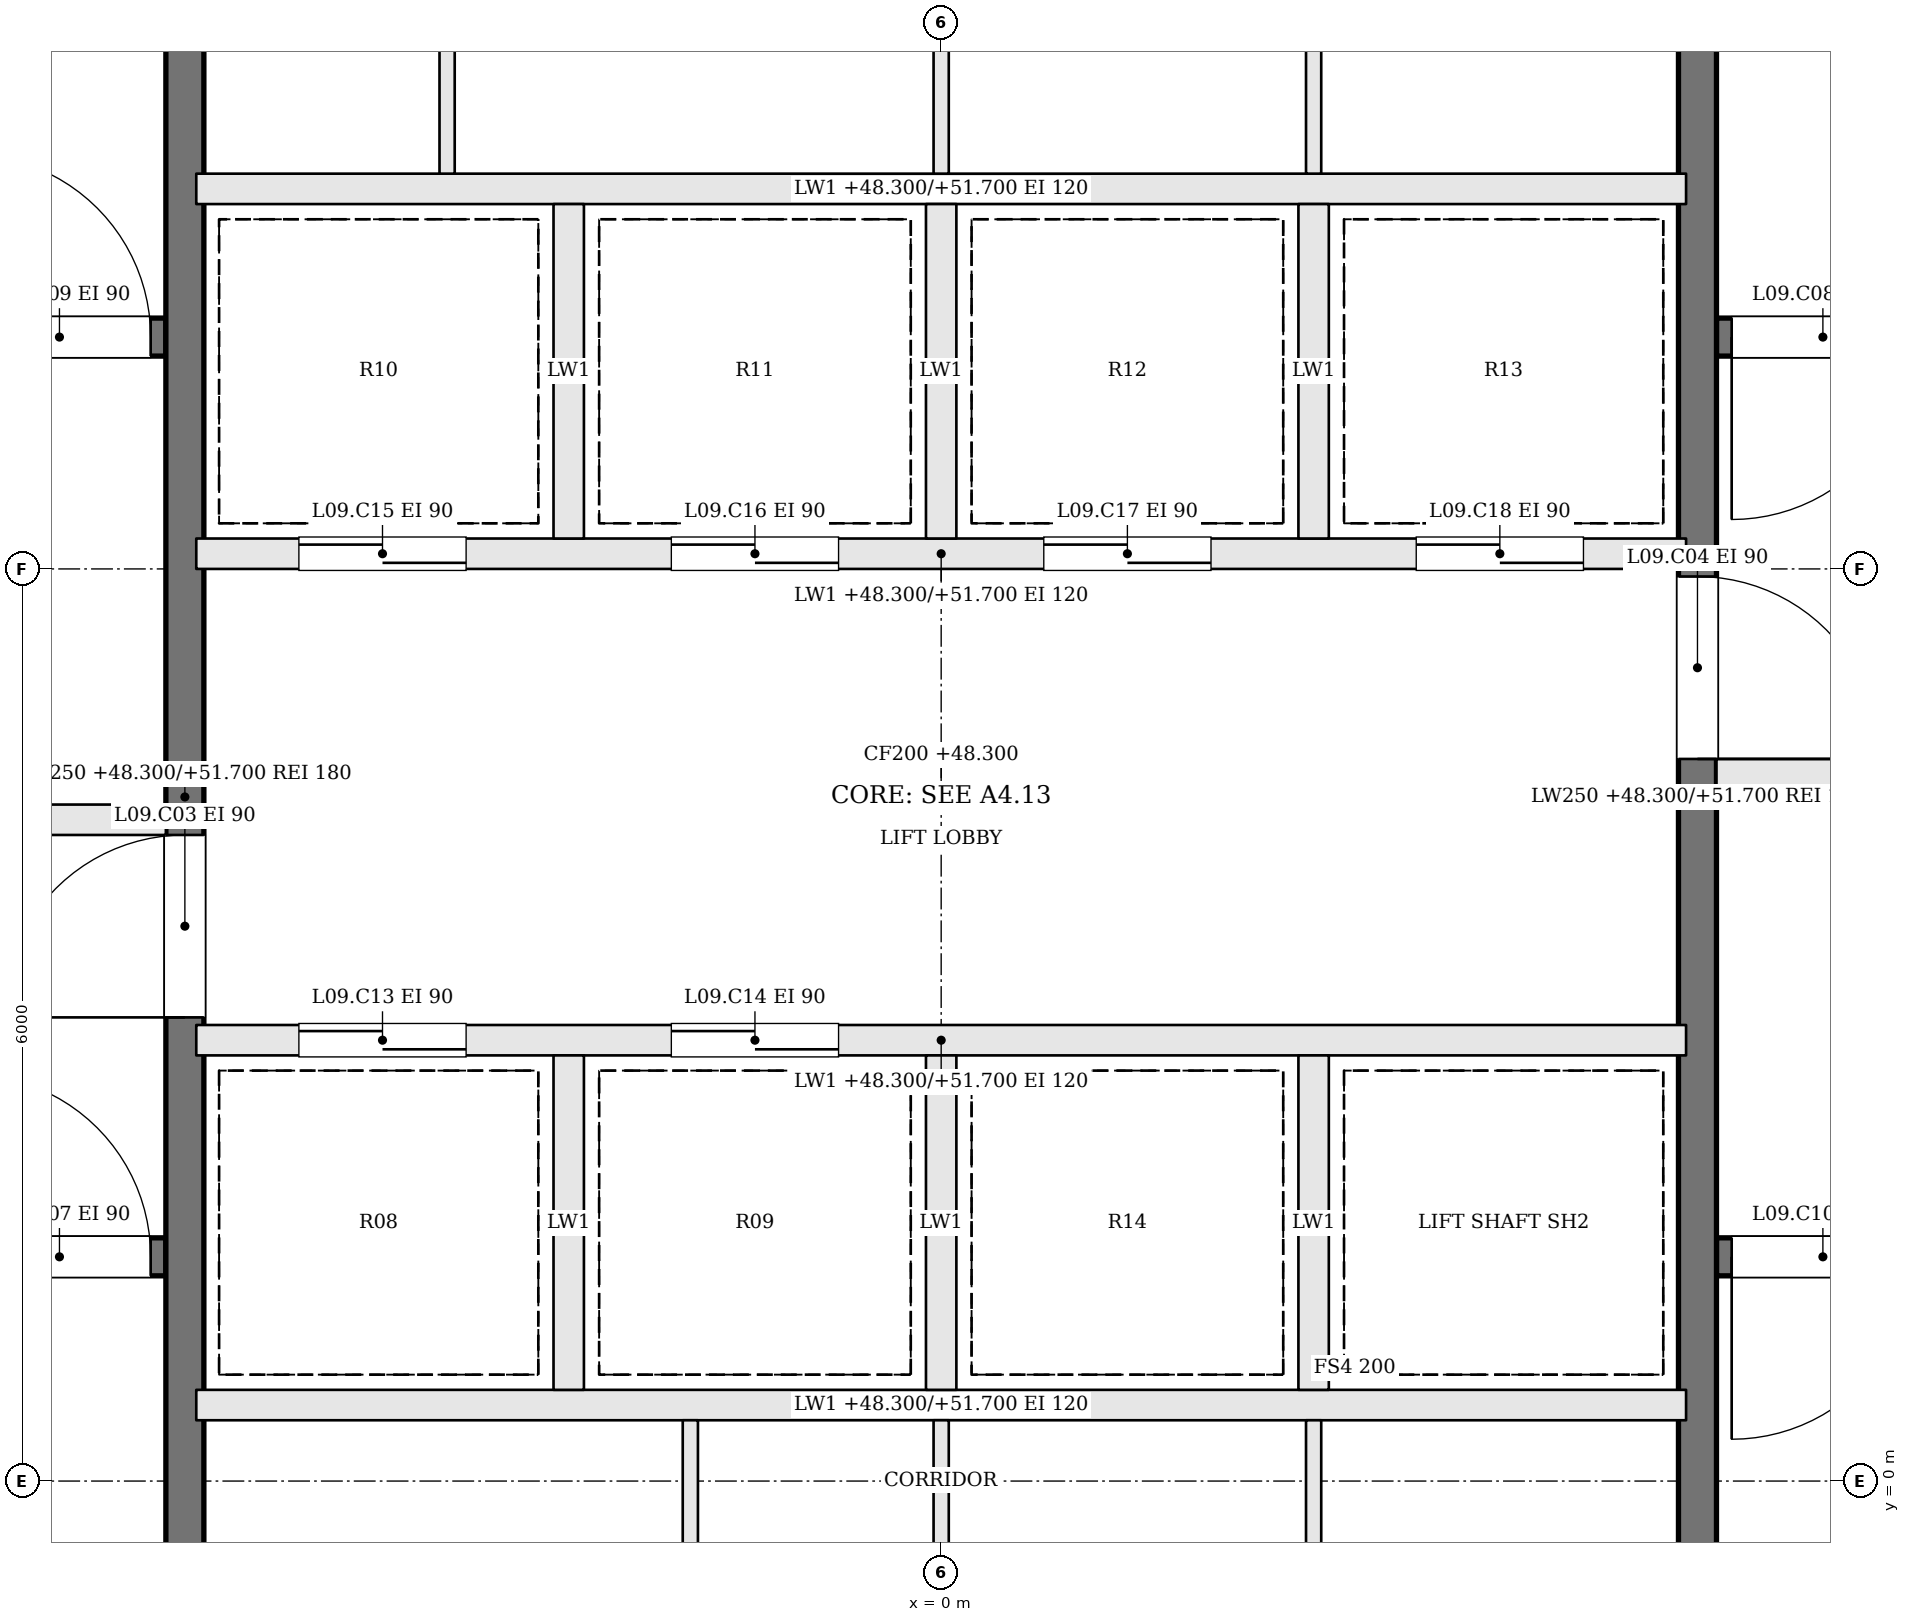
"""IFC4 building model, lengths in metres.
Left out: names, types, materials, properties, quantities, classifications, styles, units other than length and angle.
Written with IfcOpenShell. Run it as: python <this file> out.ifc"""

import sys

from ifc_helpers import new_model, si_unit, direction, frame, frame_2d, origin, place, context, subcontext, project, spatial, rectangle, extrude, element, fill, save


model = new_model("IFC4")
c1 = context("Model", 3, precision=1e-05, world=origin(), true_north=direction((0.0, 1.0)))
c2 = subcontext(c1, "Body", "Model", "MODEL_VIEW")
j1 = project(units=[si_unit("LENGTHUNIT", "METRE"), si_unit("PLANEANGLEUNIT", "RADIAN")], contexts=[c1])
p1 = place(None, origin())
s1 = spatial("IfcSite", under=j1, at=p1, CompositionType="ELEMENT")
p2 = place(p1, origin())
s2 = spatial("IfcBuilding", under=s1, at=p2, CompositionType="ELEMENT")
p3 = place(p2, frame((0.0, 0.0, 48.3)))
s3 = spatial("IfcBuildingStorey", under=s2, at=p3, CompositionType="ELEMENT", Elevation=48.3)
p4 = place(p3, frame((-11.6, 1.475, 0.0), z_axis=(0.0, 0.0, 1.0), x_axis=(1.0, 0.0, 0.0)))
e1 = element("IfcWall", 1, at=p4, inside=s3, PredefinedType="SOLIDWALL", context=c2, shape_type="SweptSolid", body=[
    extrude(rectangle(XDim=6.5, YDim=0.25, at=frame_2d((3.25, 0.0))), origin(), (0.0, 0.0, 1.0), 3.4),
])
p5 = place(p4, frame((5.2, 0.0, 0.0)))
e2 = element("IfcOpeningElement", 2, at=p5, cuts=e1, PredefinedType="OPENING", context=c2, shape_type="SweptSolid", body=[
    extrude(rectangle(XDim=1.2, YDim=2.1, at=frame_2d((0.6, 1.05))), frame((0.0, 0.135, 0.0), z_axis=(0.0, -1.0, 0.0), x_axis=(1.0, 0.0, 0.0)), (0.0, 0.0, 1.0), 0.27),
])
p6 = place(p3, frame((11.6, 7.525, 0.0), z_axis=(0.0, 0.0, 1.0), x_axis=(-1.0, 0.0, 0.0)))
e3 = element("IfcWall", 3, at=p6, inside=s3, PredefinedType="SOLIDWALL", context=c2, shape_type="SweptSolid", body=[
    extrude(rectangle(XDim=6.5, YDim=0.25, at=frame_2d((3.25, 0.0))), origin(), (0.0, 0.0, 1.0), 3.4),
])
p7 = place(p6, frame((5.2, 0.0, 0.0)))
e4 = element("IfcOpeningElement", 4, at=p7, cuts=e3, PredefinedType="OPENING", context=c2, shape_type="SweptSolid", body=[
    extrude(rectangle(XDim=1.2, YDim=2.1, at=frame_2d((0.6, 1.05))), frame((0.0, 0.135, 0.0), z_axis=(0.0, -1.0, 0.0), x_axis=(1.0, 0.0, 0.0)), (0.0, 0.0, 1.0), 0.27),
])
p8 = place(p3, frame((-11.6, 4.35, 0.0), z_axis=(0.0, 0.0, 1.0), x_axis=(1.0, 0.0, 0.0)))
e5 = element("IfcWall", 5, at=p8, inside=s3, PredefinedType="SOLIDWALL", context=c2, shape_type="SweptSolid", body=[
    extrude(rectangle(XDim=6.5, YDim=0.2, at=frame_2d((3.25, 0.0))), origin(), (0.0, 0.0, 1.0), 3.4),
])
p9 = place(p8, frame((3.8, 0.0, 0.0)))
e6 = element("IfcOpeningElement", 6, at=p9, cuts=e5, PredefinedType="OPENING", context=c2, shape_type="SweptSolid", body=[
    extrude(rectangle(XDim=1.2, YDim=2.1, at=frame_2d((0.6, 1.05))), frame((0.0, 0.11, 0.0), z_axis=(0.0, -1.0, 0.0), x_axis=(1.0, 0.0, 0.0)), (0.0, 0.0, 1.0), 0.22),
])
p10 = place(p8, frame((0.5, 0.0, 0.0)))
e7 = element("IfcOpeningElement", 7, at=p10, cuts=e5, PredefinedType="OPENING", context=c2, shape_type="SweptSolid", body=[
    extrude(rectangle(XDim=1.2, YDim=2.1, at=frame_2d((0.6, 1.05))), frame((0.0, 0.11, 0.0), z_axis=(0.0, -1.0, 0.0), x_axis=(1.0, 0.0, 0.0)), (0.0, 0.0, 1.0), 0.22),
])
p11 = place(p3, frame((11.6, 4.65, 0.0), z_axis=(0.0, 0.0, 1.0), x_axis=(-1.0, 0.0, 0.0)))
e8 = element("IfcWall", 8, at=p11, inside=s3, PredefinedType="SOLIDWALL", context=c2, shape_type="SweptSolid", body=[
    extrude(rectangle(XDim=6.5, YDim=0.2, at=frame_2d((3.25, 0.0))), origin(), (0.0, 0.0, 1.0), 3.4),
])
p12 = place(p11, frame((3.8, 0.0, 0.0)))
e9 = element("IfcOpeningElement", 9, at=p12, cuts=e8, PredefinedType="OPENING", context=c2, shape_type="SweptSolid", body=[
    extrude(rectangle(XDim=1.2, YDim=2.1, at=frame_2d((0.6, 1.05))), frame((0.0, 0.11, 0.0), z_axis=(0.0, -1.0, 0.0), x_axis=(1.0, 0.0, 0.0)), (0.0, 0.0, 1.0), 0.22),
])
p13 = place(p11, frame((0.5, 0.0, 0.0)))
e10 = element("IfcOpeningElement", 10, at=p13, cuts=e8, PredefinedType="OPENING", context=c2, shape_type="SweptSolid", body=[
    extrude(rectangle(XDim=1.2, YDim=2.1, at=frame_2d((0.6, 1.05))), frame((0.0, 0.11, 0.0), z_axis=(0.0, -1.0, 0.0), x_axis=(1.0, 0.0, 0.0)), (0.0, 0.0, 1.0), 0.22),
])
p14 = place(p3, frame((-11.6, 7.525, 0.0), z_axis=(0.0, 0.0, 1.0), x_axis=(1.0, 0.0, 0.0)))
e11 = element("IfcWall", 11, at=p14, inside=s3, PredefinedType="SOLIDWALL", context=c2, shape_type="SweptSolid", body=[
    extrude(rectangle(XDim=6.5, YDim=0.25, at=frame_2d((3.25, 0.0))), origin(), (0.0, 0.0, 1.0), 3.4),
])
p15 = place(p14, frame((5.2, 0.0, 0.0)))
e12 = element("IfcOpeningElement", 12, at=p15, cuts=e11, PredefinedType="OPENING", context=c2, shape_type="SweptSolid", body=[
    extrude(rectangle(XDim=1.2, YDim=2.1, at=frame_2d((0.6, 1.05))), frame((0.0, 0.135, 0.0), z_axis=(0.0, -1.0, 0.0), x_axis=(1.0, 0.0, 0.0)), (0.0, 0.0, 1.0), 0.27),
])
p16 = place(p3, frame((11.6, 1.475, 0.0), z_axis=(0.0, 0.0, 1.0), x_axis=(-1.0, 0.0, 0.0)))
e13 = element("IfcWall", 13, at=p16, inside=s3, PredefinedType="SOLIDWALL", context=c2, shape_type="SweptSolid", body=[
    extrude(rectangle(XDim=6.5, YDim=0.25, at=frame_2d((3.25, 0.0))), origin(), (0.0, 0.0, 1.0), 3.4),
])
p17 = place(p16, frame((5.2, 0.0, 0.0)))
e14 = element("IfcOpeningElement", 14, at=p17, cuts=e13, PredefinedType="OPENING", context=c2, shape_type="SweptSolid", body=[
    extrude(rectangle(XDim=1.2, YDim=2.1, at=frame_2d((0.6, 1.05))), frame((0.0, 0.135, 0.0), z_axis=(0.0, -1.0, 0.0), x_axis=(1.0, 0.0, 0.0)), (0.0, 0.0, 1.0), 0.27),
])
p18 = place(p3, frame((-4.975, -1.6, 0.0), z_axis=(0.0, 0.0, 1.0), x_axis=(0.0, 1.0, 0.0)))
e15 = element("IfcWall", 15, at=p18, inside=s3, PredefinedType="SOLIDWALL", context=c2, shape_type="SweptSolid", body=[
    extrude(rectangle(XDim=12.2, YDim=0.25, at=frame_2d((6.1, 0.0))), origin(), (0.0, 0.0, 1.0), 3.4),
])
p19 = place(p18, frame((4.65, 0.0, 0.0)))
e16 = element("IfcOpeningElement", 16, at=p19, cuts=e15, PredefinedType="OPENING", context=c2, shape_type="SweptSolid", body=[
    extrude(rectangle(XDim=1.2, YDim=2.1, at=frame_2d((0.6, 1.05))), frame((0.0, 0.135, 0.0), z_axis=(0.0, -1.0, 0.0), x_axis=(1.0, 0.0, 0.0)), (0.0, 0.0, 1.0), 0.27),
])
p20 = place(p3, frame((4.975, 10.6, 0.0), z_axis=(0.0, 0.0, 1.0), x_axis=(0.0, -1.0, 0.0)))
e17 = element("IfcWall", 17, at=p20, inside=s3, PredefinedType="SOLIDWALL", context=c2, shape_type="SweptSolid", body=[
    extrude(rectangle(XDim=12.2, YDim=0.25, at=frame_2d((6.1, 0.0))), origin(), (0.0, 0.0, 1.0), 3.4),
])
p21 = place(p20, frame((4.65, 0.0, 0.0)))
e18 = element("IfcOpeningElement", 18, at=p21, cuts=e17, PredefinedType="OPENING", context=c2, shape_type="SweptSolid", body=[
    extrude(rectangle(XDim=1.2, YDim=2.1, at=frame_2d((0.6, 1.05))), frame((0.0, 0.135, 0.0), z_axis=(0.0, -1.0, 0.0), x_axis=(1.0, 0.0, 0.0)), (0.0, 0.0, 1.0), 0.27),
])
p22 = place(p3, frame((-4.9, 0.5, 0.0), z_axis=(0.0, 0.0, 1.0), x_axis=(1.0, 0.0, 0.0)))
e19 = element("IfcWall", 19, at=p22, inside=s3, PredefinedType="SOLIDWALL", context=c2, shape_type="SweptSolid", body=[
    extrude(rectangle(XDim=9.8, YDim=0.2, at=frame_2d((4.9, 0.0))), origin(), (0.0, 0.0, 1.0), 3.4),
])
p23 = place(p3, frame((-4.9, 2.9, 0.0), z_axis=(0.0, 0.0, 1.0), x_axis=(1.0, 0.0, 0.0)))
e20 = element("IfcWall", 20, at=p23, inside=s3, PredefinedType="SOLIDWALL", context=c2, shape_type="SweptSolid", body=[
    extrude(rectangle(XDim=9.8, YDim=0.2, at=frame_2d((4.9, 0.0))), origin(), (0.0, 0.0, 1.0), 3.4),
])
p24 = place(p23, frame((0.675, 0.0, 0.0)))
e21 = element("IfcOpeningElement", 21, at=p24, cuts=e20, PredefinedType="OPENING", context=c2, shape_type="SweptSolid", body=[
    extrude(rectangle(XDim=1.1, YDim=2.1, at=frame_2d((0.55, 1.05))), frame((0.0, 0.11, 0.0), z_axis=(0.0, -1.0, 0.0), x_axis=(1.0, 0.0, 0.0)), (0.0, 0.0, 1.0), 0.22),
])
p25 = place(p23, frame((3.125, 0.0, 0.0)))
e22 = element("IfcOpeningElement", 22, at=p25, cuts=e20, PredefinedType="OPENING", context=c2, shape_type="SweptSolid", body=[
    extrude(rectangle(XDim=1.1, YDim=2.1, at=frame_2d((0.55, 1.05))), frame((0.0, 0.11, 0.0), z_axis=(0.0, -1.0, 0.0), x_axis=(1.0, 0.0, 0.0)), (0.0, 0.0, 1.0), 0.22),
])
p26 = place(p3, frame((-4.9, 6.1, 0.0), z_axis=(0.0, 0.0, 1.0), x_axis=(1.0, 0.0, 0.0)))
e23 = element("IfcWall", 23, at=p26, inside=s3, PredefinedType="SOLIDWALL", context=c2, shape_type="SweptSolid", body=[
    extrude(rectangle(XDim=9.8, YDim=0.2, at=frame_2d((4.9, 0.0))), origin(), (0.0, 0.0, 1.0), 3.4),
])
p27 = place(p26, frame((0.675, 0.0, 0.0)))
e24 = element("IfcOpeningElement", 24, at=p27, cuts=e23, PredefinedType="OPENING", context=c2, shape_type="SweptSolid", body=[
    extrude(rectangle(XDim=1.1, YDim=2.1, at=frame_2d((0.55, 1.05))), frame((0.0, 0.11, 0.0), z_axis=(0.0, -1.0, 0.0), x_axis=(1.0, 0.0, 0.0)), (0.0, 0.0, 1.0), 0.22),
])
p28 = place(p26, frame((3.125, 0.0, 0.0)))
e25 = element("IfcOpeningElement", 25, at=p28, cuts=e23, PredefinedType="OPENING", context=c2, shape_type="SweptSolid", body=[
    extrude(rectangle(XDim=1.1, YDim=2.1, at=frame_2d((0.55, 1.05))), frame((0.0, 0.11, 0.0), z_axis=(0.0, -1.0, 0.0), x_axis=(1.0, 0.0, 0.0)), (0.0, 0.0, 1.0), 0.22),
])
p29 = place(p26, frame((5.575, 0.0, 0.0)))
e26 = element("IfcOpeningElement", 26, at=p29, cuts=e23, PredefinedType="OPENING", context=c2, shape_type="SweptSolid", body=[
    extrude(rectangle(XDim=1.1, YDim=2.1, at=frame_2d((0.55, 1.05))), frame((0.0, 0.11, 0.0), z_axis=(0.0, -1.0, 0.0), x_axis=(1.0, 0.0, 0.0)), (0.0, 0.0, 1.0), 0.22),
])
p30 = place(p26, frame((8.025, 0.0, 0.0)))
e27 = element("IfcOpeningElement", 27, at=p30, cuts=e23, PredefinedType="OPENING", context=c2, shape_type="SweptSolid", body=[
    extrude(rectangle(XDim=1.1, YDim=2.1, at=frame_2d((0.55, 1.05))), frame((0.0, 0.11, 0.0), z_axis=(0.0, -1.0, 0.0), x_axis=(1.0, 0.0, 0.0)), (0.0, 0.0, 1.0), 0.22),
])
p31 = place(p3, frame((-4.9, 8.5, 0.0), z_axis=(0.0, 0.0, 1.0), x_axis=(1.0, 0.0, 0.0)))
e28 = element("IfcWall", 28, at=p31, inside=s3, PredefinedType="SOLIDWALL", context=c2, shape_type="SweptSolid", body=[
    extrude(rectangle(XDim=9.8, YDim=0.2, at=frame_2d((4.9, 0.0))), origin(), (0.0, 0.0, 1.0), 3.4),
])
for number, where, z_axis, x_axis in (
    (29, (-2.45, 0.6, 0.0), (0.0, 0.0, 1.0), (0.0, 1.0, 0.0)),
    (30, (0.0, 0.6, 0.0), (0.0, 0.0, 1.0), (0.0, 1.0, 0.0)),
    (31, (2.45, 0.6, 0.0), (0.0, 0.0, 1.0), (0.0, 1.0, 0.0)),
    (32, (-2.45, 6.2, 0.0), (0.0, 0.0, 1.0), (0.0, 1.0, 0.0)),
    (33, (0.0, 6.2, 0.0), (0.0, 0.0, 1.0), (0.0, 1.0, 0.0)),
    (34, (2.45, 6.2, 0.0), (0.0, 0.0, 1.0), (0.0, 1.0, 0.0)),
):
    element("IfcWall", number, at=place(p3, frame(where, z_axis=z_axis, x_axis=x_axis)), inside=s3, PredefinedType="SOLIDWALL", context=c2, shape_type="SweptSolid", body=[
        extrude(rectangle(XDim=2.2, YDim=0.2, at=frame_2d((1.1, 0.0))), origin(), (0.0, 0.0, 1.0), 3.4),
    ])
for number, where, z_axis, x_axis in (
    (35, (-1.65, -1.6, 0.0), (0.0, 0.0, 1.0), (0.0, 1.0, 0.0)),
    (36, (0.0, -1.6, 0.0), (0.0, 0.0, 1.0), (0.0, 1.0, 0.0)),
    (37, (2.45, -1.6, 0.0), (0.0, 0.0, 1.0), (0.0, 1.0, 0.0)),
    (38, (-3.25, 8.6, 0.0), (0.0, 0.0, 1.0), (0.0, 1.0, 0.0)),
    (39, (0.0, 8.6, 0.0), (0.0, 0.0, 1.0), (0.0, 1.0, 0.0)),
    (40, (2.45, 8.6, 0.0), (0.0, 0.0, 1.0), (0.0, 1.0, 0.0)),
):
    element("IfcWall", number, at=place(p3, frame(where, z_axis=z_axis, x_axis=x_axis)), inside=s3, PredefinedType="PARTITIONING", context=c2, shape_type="SweptSolid", body=[
        extrude(rectangle(XDim=2.0, YDim=0.1, at=frame_2d((1.0, 0.0))), origin(), (0.0, 0.0, 1.0), 3.4),
    ])
p32 = place(p19, origin())
e41 = element("IfcDoor", 41, at=p32, inside=s3, OperationType="SINGLE_SWING_LEFT", PredefinedType="DOOR", context=c2, shape_type="SweptSolid", body=[
    extrude(rectangle(XDim=1.2, YDim=2.1, at=frame_2d((0.6, 1.05))), frame((0.0, 0.025, 0.0), z_axis=(0.0, -1.0, 0.0), x_axis=(1.0, 0.0, 0.0)), (0.0, 0.0, 1.0), 0.05),
])
fill(e16, e41)
p33 = place(p21, origin())
e42 = element("IfcDoor", 42, at=p33, inside=s3, OperationType="SINGLE_SWING_RIGHT", PredefinedType="DOOR", context=c2, shape_type="SweptSolid", body=[
    extrude(rectangle(XDim=1.2, YDim=2.1, at=frame_2d((0.6, 1.05))), frame((0.0, 0.025, 0.0), z_axis=(0.0, -1.0, 0.0), x_axis=(1.0, 0.0, 0.0)), (0.0, 0.0, 1.0), 0.05),
])
fill(e18, e42)
p34 = place(p5, origin())
e43 = element("IfcDoor", 43, at=p34, inside=s3, OperationType="SINGLE_SWING_LEFT", PredefinedType="DOOR", context=c2, shape_type="SweptSolid", body=[
    extrude(rectangle(XDim=1.2, YDim=2.1, at=frame_2d((0.6, 1.05))), frame((0.0, 0.025, 0.0), z_axis=(0.0, -1.0, 0.0), x_axis=(1.0, 0.0, 0.0)), (0.0, 0.0, 1.0), 0.05),
])
fill(e2, e43)
p35 = place(p7, origin())
e44 = element("IfcDoor", 44, at=p35, inside=s3, OperationType="SINGLE_SWING_RIGHT", PredefinedType="DOOR", context=c2, shape_type="SweptSolid", body=[
    extrude(rectangle(XDim=1.2, YDim=2.1, at=frame_2d((0.6, 1.05))), frame((0.0, 0.025, 0.0), z_axis=(0.0, -1.0, 0.0), x_axis=(1.0, 0.0, 0.0)), (0.0, 0.0, 1.0), 0.05),
])
fill(e4, e44)
p36 = place(p15, origin())
e45 = element("IfcDoor", 45, at=p36, inside=s3, OperationType="SINGLE_SWING_LEFT", PredefinedType="DOOR", context=c2, shape_type="SweptSolid", body=[
    extrude(rectangle(XDim=1.2, YDim=2.1, at=frame_2d((0.6, 1.05))), frame((0.0, 0.025, 0.0), z_axis=(0.0, -1.0, 0.0), x_axis=(1.0, 0.0, 0.0)), (0.0, 0.0, 1.0), 0.05),
])
fill(e12, e45)
p37 = place(p17, origin())
e46 = element("IfcDoor", 46, at=p37, inside=s3, OperationType="SINGLE_SWING_RIGHT", PredefinedType="DOOR", context=c2, shape_type="SweptSolid", body=[
    extrude(rectangle(XDim=1.2, YDim=2.1, at=frame_2d((0.6, 1.05))), frame((0.0, 0.025, 0.0), z_axis=(0.0, -1.0, 0.0), x_axis=(1.0, 0.0, 0.0)), (0.0, 0.0, 1.0), 0.05),
])
fill(e14, e46)
p38 = place(p24, origin())
e47 = element("IfcDoor", 47, at=p38, inside=s3, OperationType="SLIDING_TO_RIGHT", PredefinedType="DOOR", context=c2, shape_type="SweptSolid", body=[
    extrude(rectangle(XDim=1.1, YDim=2.1, at=frame_2d((0.55, 1.05))), frame((0.0, 0.025, 0.0), z_axis=(0.0, -1.0, 0.0), x_axis=(1.0, 0.0, 0.0)), (0.0, 0.0, 1.0), 0.05),
])
fill(e21, e47)
p39 = place(p25, origin())
e48 = element("IfcDoor", 48, at=p39, inside=s3, OperationType="SLIDING_TO_LEFT", PredefinedType="DOOR", context=c2, shape_type="SweptSolid", body=[
    extrude(rectangle(XDim=1.1, YDim=2.1, at=frame_2d((0.55, 1.05))), frame((0.0, 0.025, 0.0), z_axis=(0.0, -1.0, 0.0), x_axis=(1.0, 0.0, 0.0)), (0.0, 0.0, 1.0), 0.05),
])
fill(e22, e48)
p40 = place(p27, origin())
e49 = element("IfcDoor", 49, at=p40, inside=s3, OperationType="SLIDING_TO_RIGHT", PredefinedType="DOOR", context=c2, shape_type="SweptSolid", body=[
    extrude(rectangle(XDim=1.1, YDim=2.1, at=frame_2d((0.55, 1.05))), frame((0.0, 0.025, 0.0), z_axis=(0.0, -1.0, 0.0), x_axis=(1.0, 0.0, 0.0)), (0.0, 0.0, 1.0), 0.05),
])
fill(e24, e49)
p41 = place(p28, origin())
e50 = element("IfcDoor", 50, at=p41, inside=s3, OperationType="SLIDING_TO_LEFT", PredefinedType="DOOR", context=c2, shape_type="SweptSolid", body=[
    extrude(rectangle(XDim=1.1, YDim=2.1, at=frame_2d((0.55, 1.05))), frame((0.0, 0.025, 0.0), z_axis=(0.0, -1.0, 0.0), x_axis=(1.0, 0.0, 0.0)), (0.0, 0.0, 1.0), 0.05),
])
fill(e25, e50)
p42 = place(p29, origin())
e51 = element("IfcDoor", 51, at=p42, inside=s3, OperationType="SLIDING_TO_RIGHT", PredefinedType="DOOR", context=c2, shape_type="SweptSolid", body=[
    extrude(rectangle(XDim=1.1, YDim=2.1, at=frame_2d((0.55, 1.05))), frame((0.0, 0.025, 0.0), z_axis=(0.0, -1.0, 0.0), x_axis=(1.0, 0.0, 0.0)), (0.0, 0.0, 1.0), 0.05),
])
fill(e26, e51)
p43 = place(p30, origin())
e52 = element("IfcDoor", 52, at=p43, inside=s3, OperationType="SLIDING_TO_LEFT", PredefinedType="DOOR", context=c2, shape_type="SweptSolid", body=[
    extrude(rectangle(XDim=1.1, YDim=2.1, at=frame_2d((0.55, 1.05))), frame((0.0, 0.025, 0.0), z_axis=(0.0, -1.0, 0.0), x_axis=(1.0, 0.0, 0.0)), (0.0, 0.0, 1.0), 0.05),
])
fill(e27, e52)
save(model, sys.argv[1])
